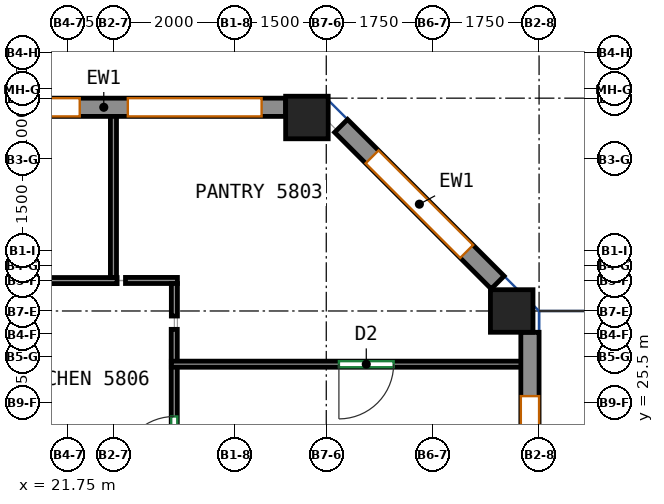
"""IFC4 building model, lengths in metres.
Left out: names, types, materials, properties, quantities, classifications, styles, units other than length and angle.
Written with IfcOpenShell. Run it as: python <this file> out.ifc"""

import sys

from ifc_helpers import new_model, si_unit, direction, frame, frame_2d, origin, origin_2d, place, context, subcontext, project, spatial, rectangle, extrude, source, transform, mapped, element, fill, save


model = new_model("IFC4")
c1 = context("Model", 3, precision=1e-05, world=origin(), true_north=direction((0.0, 1.0)))
c2 = subcontext(c1, "Body", "Model", "MODEL_VIEW")
j1 = project(units=[si_unit("LENGTHUNIT", "METRE"), si_unit("PLANEANGLEUNIT", "RADIAN")], contexts=[c1])
p1 = place(None, origin())
s1 = spatial("IfcSite", under=j1, at=p1, CompositionType="ELEMENT")
p2 = place(p1, origin())
s2 = spatial("IfcBuilding", under=s1, at=p2, CompositionType="ELEMENT")
p3 = place(p2, frame((0.0, 0.0, 242.4)))
s3 = spatial("IfcBuildingStorey", under=s2, at=p3, CompositionType="ELEMENT", Elevation=242.4)
m1 = source(origin(), c2, "Body", "SweptSolid", [
    extrude(rectangle(XDim=0.7, YDim=0.7, at=origin_2d()), origin(), (0.0, 0.0, 1.0), 3.12),
])
for number, where, z_axis, x_axis in (
    (1, (25.682, 30.182, 0.0), (0.0, 0.0, 1.0), (1.0, 0.0, 0.0)),
    (2, (29.05, 27.0, 0.0), (0.0, 0.0, 1.0), (1.0, 0.0, 0.0)),
):
    element("IfcColumn", number, at=place(p3, frame(where, z_axis=z_axis, x_axis=x_axis)), inside=s3, PredefinedType="COLUMN", context=c2, shape_type="MappedRepresentation", body=[
        mapped(m1, transform((0.0, 0.0, 0.0))),
    ])
m2 = source(origin(), c2, "Body", "SweptSolid", [
    extrude(rectangle(XDim=4.3, YDim=0.3, at=frame_2d((2.15, 0.0))), origin(), (0.0, 0.0, 1.0), 3.12),
])
p4 = place(p3, frame((29.35, 22.35, 0.0), z_axis=(0.0, 0.0, 1.0), x_axis=(0.0, 1.0, 0.0)))
e3 = element("IfcWall", 3, at=p4, inside=s3, PredefinedType="SOLIDWALL", context=c2, shape_type="MappedRepresentation", body=[
    mapped(m2, transform((0.0, 0.0, 0.0))),
])
p5 = place(p4, frame((1.75, 0.0, 0.8)))
e4 = element("IfcOpeningElement", 4, at=p5, cuts=e3, PredefinedType="OPENING", context=c2, shape_type="SweptSolid", body=[
    extrude(rectangle(XDim=1.5, YDim=2.05, at=frame_2d((0.75, 1.025))), frame((0.0, 0.16, 0.0), z_axis=(0.0, -1.0, 0.0), x_axis=(1.0, 0.0, 0.0)), (0.0, 0.0, 1.0), 0.32),
])
p6 = place(p4, frame((0.45, 0.0, 0.0)))
e5 = element("IfcOpeningElement", 5, at=p6, cuts=e3, PredefinedType="OPENING", context=c2, shape_type="SweptSolid", body=[
    extrude(rectangle(XDim=1.0, YDim=2.1, at=frame_2d((0.5, 1.05))), frame((0.0, 0.16, 0.0), z_axis=(0.0, -1.0, 0.0), x_axis=(1.0, 0.0, 0.0)), (0.0, 0.0, 1.0), 0.32),
])
m3 = source(origin(), c2, "Body", "SweptSolid", [
    extrude(rectangle(XDim=3.642, YDim=0.3, at=frame_2d((1.821, 0.0))), origin(), (0.0, 0.0, 1.0), 3.12),
])
p7 = place(p3, frame((28.819, 27.469, 0.0), z_axis=(0.0, 0.0, 1.0), x_axis=(-0.707106781187, 0.707106781187, 0.0)))
e6 = element("IfcWall", 6, at=p7, inside=s3, PredefinedType="SOLIDWALL", context=c2, shape_type="MappedRepresentation", body=[
    mapped(m3, transform((0.0, 0.0, 0.0))),
])
p8 = place(p7, frame((0.721, 0.0, 0.8)))
e7 = element("IfcOpeningElement", 7, at=p8, cuts=e6, PredefinedType="OPENING", context=c2, shape_type="SweptSolid", body=[
    extrude(rectangle(XDim=2.2, YDim=2.05, at=frame_2d((1.1, 1.025))), frame((0.0, 0.16, 0.0), z_axis=(0.0, -1.0, 0.0), x_axis=(1.0, 0.0, 0.0)), (0.0, 0.0, 1.0), 0.32),
])
m4 = source(origin(), c2, "Body", "SweptSolid", [
    extrude(rectangle(XDim=5.982, YDim=0.3, at=frame_2d((2.991, 0.0))), origin(), (0.0, 0.0, 1.0), 3.12),
])
p9 = place(p3, frame((25.332, 30.35, 0.0), z_axis=(0.0, 0.0, 1.0), x_axis=(-1.0, 0.0, 0.0)))
e8 = element("IfcWall", 8, at=p9, inside=s3, PredefinedType="SOLIDWALL", context=c2, shape_type="MappedRepresentation", body=[
    mapped(m4, transform((0.0, 0.0, 0.0))),
])
p10 = place(p9, frame((0.396, 0.0, 0.8)))
e9 = element("IfcOpeningElement", 9, at=p10, cuts=e8, PredefinedType="OPENING", context=c2, shape_type="SweptSolid", body=[
    extrude(rectangle(XDim=2.2, YDim=2.05, at=frame_2d((1.1, 1.025))), frame((0.0, 0.16, 0.0), z_axis=(0.0, -1.0, 0.0), x_axis=(1.0, 0.0, 0.0)), (0.0, 0.0, 1.0), 0.32),
])
p11 = place(p9, frame((3.386, 0.0, 0.8)))
e10 = element("IfcOpeningElement", 10, at=p11, cuts=e8, PredefinedType="OPENING", context=c2, shape_type="SweptSolid", body=[
    extrude(rectangle(XDim=2.2, YDim=2.05, at=frame_2d((1.1, 1.025))), frame((0.0, 0.16, 0.0), z_axis=(0.0, -1.0, 0.0), x_axis=(1.0, 0.0, 0.0)), (0.0, 0.0, 1.0), 0.32),
])
p12 = place(p3, frame((11.9, 27.5, 0.0), z_axis=(0.0, 0.0, 1.0), x_axis=(1.0, 0.0, 0.0)))
e11 = element("IfcWall", 11, at=p12, inside=s3, PredefinedType="PARTITIONING", context=c2, shape_type="SweptSolid", body=[
    extrude(rectangle(XDim=10.66, YDim=0.1, at=frame_2d((5.33, 0.0))), origin(), (0.0, 0.0, 1.0), 3.12),
])
p13 = place(p12, frame((2.02, 0.0, 0.0)))
e12 = element("IfcOpeningElement", 12, at=p13, cuts=e11, PredefinedType="OPENING", context=c2, shape_type="SweptSolid", body=[
    extrude(rectangle(XDim=1.0, YDim=2.1, at=frame_2d((0.5, 1.05))), frame((0.0, 0.06, 0.0), z_axis=(0.0, -1.0, 0.0), x_axis=(1.0, 0.0, 0.0)), (0.0, 0.0, 1.0), 0.12),
])
p14 = place(p3, frame((23.5, 22.1, 0.0), z_axis=(0.0, 0.0, 1.0), x_axis=(0.0, 1.0, 0.0)))
e13 = element("IfcWall", 13, at=p14, inside=s3, PredefinedType="PARTITIONING", context=c2, shape_type="SweptSolid", body=[
    extrude(rectangle(XDim=3.985, YDim=0.1, at=frame_2d((1.992, 0.0))), origin(), (0.0, 0.0, 1.0), 3.12),
])
p15 = place(p14, frame((2.265, 0.0, 0.0)))
e14 = element("IfcOpeningElement", 14, at=p15, cuts=e13, PredefinedType="OPENING", context=c2, shape_type="SweptSolid", body=[
    extrude(rectangle(XDim=0.9, YDim=2.1, at=frame_2d((0.45, 1.05))), frame((0.0, 0.06, 0.0), z_axis=(0.0, -1.0, 0.0), x_axis=(1.0, 0.0, 0.0)), (0.0, 0.0, 1.0), 0.12),
])
p16 = place(p3, frame((23.552, 27.502, 0.0), z_axis=(0.0, 0.0, 1.0), x_axis=(-1.0, 0.0, 0.0)))
e15 = element("IfcWall", 15, at=p16, inside=s3, PredefinedType="PARTITIONING", context=c2, shape_type="SweptSolid", body=[
    extrude(rectangle(XDim=0.854, YDim=0.1, at=frame_2d((0.427, 0.0))), origin(), (0.0, 0.0, 1.0), 3.12),
])
p17 = place(p3, frame((23.502, 26.917, 0.0), z_axis=(0.0, 0.0, 1.0), x_axis=(0.0, 1.0, 0.0)))
e16 = element("IfcWall", 16, at=p17, inside=s3, PredefinedType="PARTITIONING", context=c2, shape_type="SweptSolid", body=[
    extrude(rectangle(XDim=0.535, YDim=0.1, at=frame_2d((0.268, 0.0))), origin(), (0.0, 0.0, 1.0), 3.12),
])
p18 = place(p3, frame((23.5, 26.165, 0.0), z_axis=(0.0, 0.0, 1.0), x_axis=(0.0, 1.0, 0.0)))
e17 = element("IfcWall", 17, at=p18, inside=s3, PredefinedType="PARTITIONING", context=c2, shape_type="SweptSolid", body=[
    extrude(rectangle(XDim=0.533, YDim=0.1, at=frame_2d((0.267, 0.0))), origin(), (0.0, 0.0, 1.0), 3.12),
])
p19 = place(p3, frame((22.5, 27.552, 0.0), z_axis=(0.0, 0.0, 1.0), x_axis=(0.0, 1.0, 0.0)))
e18 = element("IfcWall", 18, at=p19, inside=s3, PredefinedType="PARTITIONING", context=c2, shape_type="SweptSolid", body=[
    extrude(rectangle(XDim=2.698, YDim=0.1, at=frame_2d((1.349, 0.0))), origin(), (0.0, 0.0, 1.0), 3.12),
])
p20 = place(p3, frame((29.25, 26.125, 0.0), z_axis=(0.0, 0.0, 1.0), x_axis=(-1.0, 0.0, 0.0)))
e19 = element("IfcWall", 19, at=p20, inside=s3, PredefinedType="PARTITIONING", context=c2, shape_type="SweptSolid", body=[
    extrude(rectangle(XDim=5.798, YDim=0.1, at=frame_2d((2.899, 0.0))), origin(), (0.0, 0.0, 1.0), 3.12),
])
p21 = place(p20, frame((2.142, 0.0, 0.0)))
e20 = element("IfcOpeningElement", 20, at=p21, cuts=e19, PredefinedType="OPENING", context=c2, shape_type="SweptSolid", body=[
    extrude(rectangle(XDim=0.9, YDim=2.1, at=frame_2d((0.45, 1.05))), frame((0.0, 0.06, 0.0), z_axis=(0.0, -1.0, 0.0), x_axis=(1.0, 0.0, 0.0)), (0.0, 0.0, 1.0), 0.12),
])
p22 = place(p5, origin())
e21 = element("IfcWindow", 21, at=p22, inside=s3, PartitioningType="SINGLE_PANEL", PredefinedType="WINDOW", context=c2, shape_type="SweptSolid", body=[
    extrude(rectangle(XDim=1.5, YDim=2.05, at=frame_2d((0.75, 1.025))), frame((0.0, 0.03, 0.0), z_axis=(0.0, -1.0, 0.0), x_axis=(1.0, 0.0, 0.0)), (0.0, 0.0, 1.0), 0.06),
])
fill(e4, e21)
p23 = place(p8, origin())
e22 = element("IfcWindow", 22, at=p23, inside=s3, PartitioningType="SINGLE_PANEL", PredefinedType="WINDOW", context=c2, shape_type="SweptSolid", body=[
    extrude(rectangle(XDim=2.2, YDim=2.05, at=frame_2d((1.1, 1.025))), frame((0.0, 0.03, 0.0), z_axis=(0.0, -1.0, 0.0), x_axis=(1.0, 0.0, 0.0)), (0.0, 0.0, 1.0), 0.06),
])
fill(e7, e22)
p24 = place(p10, origin())
e23 = element("IfcWindow", 23, at=p24, inside=s3, PartitioningType="SINGLE_PANEL", PredefinedType="WINDOW", context=c2, shape_type="SweptSolid", body=[
    extrude(rectangle(XDim=2.2, YDim=2.05, at=frame_2d((1.1, 1.025))), frame((0.0, 0.03, 0.0), z_axis=(0.0, -1.0, 0.0), x_axis=(1.0, 0.0, 0.0)), (0.0, 0.0, 1.0), 0.06),
])
fill(e9, e23)
p25 = place(p11, origin())
e24 = element("IfcWindow", 24, at=p25, inside=s3, PartitioningType="SINGLE_PANEL", PredefinedType="WINDOW", context=c2, shape_type="SweptSolid", body=[
    extrude(rectangle(XDim=2.2, YDim=2.05, at=frame_2d((1.1, 1.025))), frame((0.0, 0.03, 0.0), z_axis=(0.0, -1.0, 0.0), x_axis=(1.0, 0.0, 0.0)), (0.0, 0.0, 1.0), 0.06),
])
fill(e10, e24)
p26 = place(p15, origin())
e25 = element("IfcDoor", 25, at=p26, inside=s3, OperationType="SINGLE_SWING_LEFT", PredefinedType="DOOR", context=c2, shape_type="SweptSolid", body=[
    extrude(rectangle(XDim=0.9, YDim=2.1, at=frame_2d((0.45, 1.05))), frame((0.0, 0.025, 0.0), z_axis=(0.0, -1.0, 0.0), x_axis=(1.0, 0.0, 0.0)), (0.0, 0.0, 1.0), 0.05),
])
fill(e14, e25)
p27 = place(p21, origin())
e26 = element("IfcDoor", 26, at=p27, inside=s3, OperationType="SINGLE_SWING_RIGHT", PredefinedType="DOOR", context=c2, shape_type="SweptSolid", body=[
    extrude(rectangle(XDim=0.9, YDim=2.1, at=frame_2d((0.45, 1.05))), frame((0.0, 0.025, 0.0), z_axis=(0.0, -1.0, 0.0), x_axis=(1.0, 0.0, 0.0)), (0.0, 0.0, 1.0), 0.05),
])
fill(e20, e26)
save(model, sys.argv[1])
